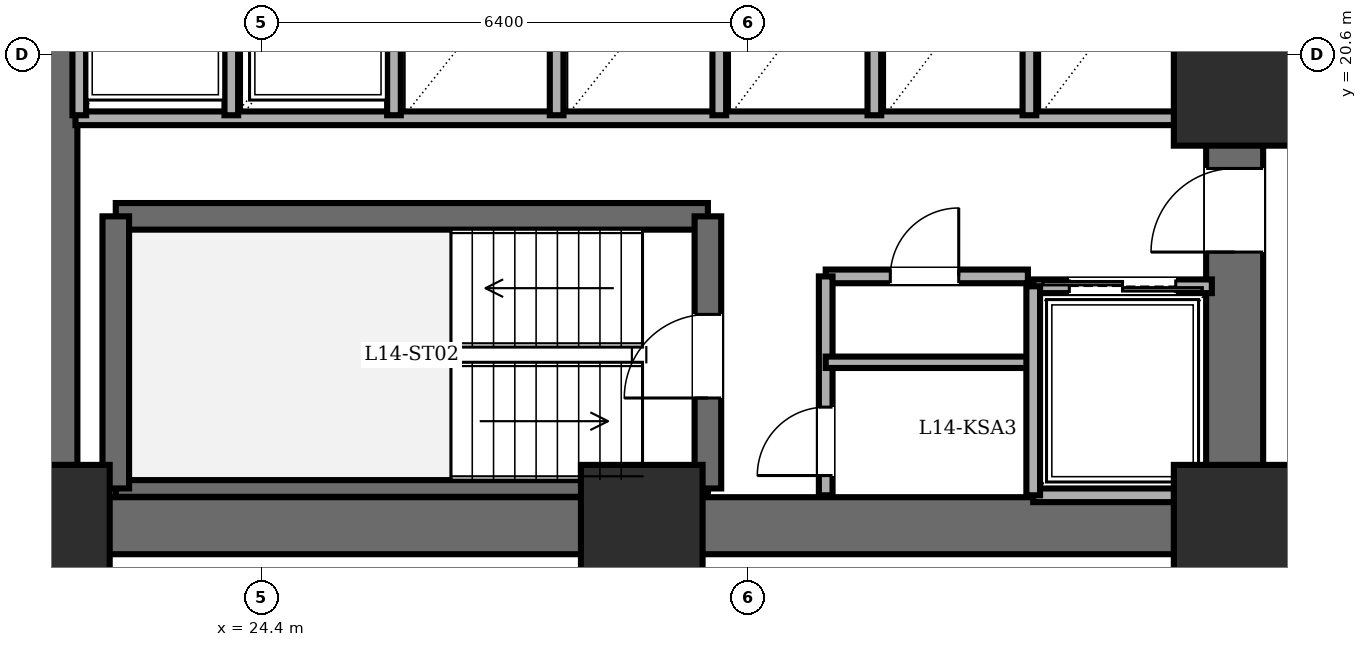
"""IFC4 building model, lengths in metres.
Left out: names, types, materials, properties, quantities, classifications, styles, units other than length and angle.
Written with IfcOpenShell. Run it as: python <this file> out.ifc"""

import sys

from ifc_helpers import new_model, si_unit, direction, frame, frame_2d, origin, origin_2d, place, context, subcontext, project, spatial, rectangle, extrude, element, fill, save


model = new_model("IFC4")
c1 = context("Model", 3, precision=1e-05, world=origin(), true_north=direction((0.0, 1.0)))
c2 = subcontext(c1, "Body", "Model", "MODEL_VIEW")
j1 = project(units=[si_unit("LENGTHUNIT", "METRE"), si_unit("PLANEANGLEUNIT", "RADIAN")], contexts=[c1])
p1 = place(None, origin())
s1 = spatial("IfcSite", under=j1, at=p1, CompositionType="ELEMENT")
p2 = place(p1, origin())
s2 = spatial("IfcBuilding", under=s1, at=p2, CompositionType="ELEMENT")
p3 = place(p2, frame((0.0, 0.0, 54.0)))
s3 = spatial("IfcBuildingStorey", under=s2, at=p3, CompositionType="ELEMENT", Elevation=54.0)
for number, where, z_axis, x_axis in (
    (1, (21.6, 14.4, 0.0), (0.0, 0.0, 1.0), (1.0, 0.0, 0.0)),
    (2, (29.4, 14.4, 0.0), (0.0, 0.0, 1.0), (1.0, 0.0, 0.0)),
    (3, (37.2, 14.4, 0.0), (0.0, 0.0, 1.0), (1.0, 0.0, 0.0)),
    (4, (37.2, 20.2, 0.0), (0.0, 0.0, 1.0), (1.0, 0.0, 0.0)),
):
    element("IfcColumn", number, at=place(p3, frame(where, z_axis=z_axis, x_axis=x_axis)), inside=s3, PredefinedType="COLUMN", context=c2, shape_type="SweptSolid", body=[
        extrude(rectangle(XDim=1.6, YDim=1.6, at=origin_2d()), origin(), (0.0, 0.0, 1.0), 3.6),
    ])
p4 = place(p3, frame((21.6, 14.4, 0.0), z_axis=(0.0, 0.0, 1.0), x_axis=(0.0, 1.0, 0.0)))
e5 = element("IfcWall", 5, at=p4, inside=s3, PredefinedType="SHEAR", context=c2, shape_type="SweptSolid", body=[
    extrude(rectangle(XDim=19.2, YDim=0.75, at=frame_2d((9.6, 0.0))), origin(), (0.0, 0.0, 1.0), 3.4),
])
p5 = place(p3, frame((37.2, 14.4, 0.0), z_axis=(0.0, 0.0, 1.0), x_axis=(-1.0, 0.0, 0.0)))
e6 = element("IfcWall", 6, at=p5, inside=s3, PredefinedType="SHEAR", context=c2, shape_type="SweptSolid", body=[
    extrude(rectangle(XDim=15.6, YDim=0.75, at=frame_2d((7.8, 0.0))), origin(), (0.0, 0.0, 1.0), 3.4),
])
p6 = place(p3, frame((37.2, 14.4, 0.0), z_axis=(0.0, 0.0, 1.0), x_axis=(0.0, 1.0, 0.0)))
e7 = element("IfcWall", 7, at=p6, inside=s3, PredefinedType="SHEAR", context=c2, shape_type="SweptSolid", body=[
    extrude(rectangle(XDim=19.2, YDim=0.75, at=frame_2d((9.6, 0.0))), origin(), (0.0, 0.0, 1.0), 3.4),
])
p7 = place(p6, frame((15.8, 0.0, 0.0)))
e8 = element("IfcOpeningElement", 8, at=p7, cuts=e7, PredefinedType="OPENING", context=c2, shape_type="SweptSolid", body=[
    extrude(rectangle(XDim=1.15, YDim=2.15, at=frame_2d((0.575, 1.075))), frame((0.0, 0.385, 0.0), z_axis=(0.0, -1.0, 0.0), x_axis=(1.0, 0.0, 0.0)), (0.0, 0.0, 1.0), 0.77),
])
p8 = place(p6, frame((3.6, 0.0, 0.0)))
e9 = element("IfcOpeningElement", 9, at=p8, cuts=e7, PredefinedType="OPENING", context=c2, shape_type="SweptSolid", body=[
    extrude(rectangle(XDim=1.1, YDim=2.15, at=frame_2d((0.55, 1.075))), frame((0.0, 0.385, 0.0), z_axis=(0.0, -1.0, 0.0), x_axis=(1.0, 0.0, 0.0)), (0.0, 0.0, 1.0), 0.77),
])
p9 = place(p6, frame((8.6, 0.0, 0.0)))
e10 = element("IfcOpeningElement", 10, at=p9, cuts=e7, PredefinedType="OPENING", context=c2, shape_type="SweptSolid", body=[
    extrude(rectangle(XDim=1.3, YDim=2.2, at=frame_2d((0.65, 1.1))), frame((0.0, 0.385, 0.0), z_axis=(0.0, -1.0, 0.0), x_axis=(1.0, 0.0, 0.0)), (0.0, 0.0, 1.0), 0.77),
])
p10 = place(p3, frame((22.48, 18.47, 0.0), z_axis=(0.0, 0.0, 1.0), x_axis=(1.0, 0.0, 0.0)))
e11 = element("IfcWall", 11, at=p10, inside=s3, PredefinedType="SOLIDWALL", context=c2, shape_type="SweptSolid", body=[
    extrude(rectangle(XDim=7.79, YDim=0.35, at=frame_2d((3.895, 0.0))), origin(), (0.0, 0.0, 1.0), 3.4),
])
p11 = place(p3, frame((22.48, 14.89, 0.0), z_axis=(0.0, 0.0, 1.0), x_axis=(1.0, 0.0, 0.0)))
e12 = element("IfcWall", 12, at=p11, inside=s3, PredefinedType="PARTITIONING", context=c2, shape_type="SweptSolid", body=[
    extrude(rectangle(XDim=7.79, YDim=0.22, at=frame_2d((3.895, 0.0))), origin(), (0.0, 0.0, 1.0), 3.4),
])
p12 = place(p3, frame((22.48, 14.89, 0.0), z_axis=(0.0, 0.0, 1.0), x_axis=(0.0, 1.0, 0.0)))
e13 = element("IfcWall", 13, at=p12, inside=s3, PredefinedType="SOLIDWALL", context=c2, shape_type="SweptSolid", body=[
    extrude(rectangle(XDim=3.58, YDim=0.35, at=frame_2d((1.79, 0.0))), origin(), (0.0, 0.0, 1.0), 3.4),
])
p13 = place(p3, frame((30.27, 14.89, 0.0), z_axis=(0.0, 0.0, 1.0), x_axis=(0.0, 1.0, 0.0)))
e14 = element("IfcWall", 14, at=p13, inside=s3, PredefinedType="SOLIDWALL", context=c2, shape_type="SweptSolid", body=[
    extrude(rectangle(XDim=3.58, YDim=0.35, at=frame_2d((1.79, 0.0))), origin(), (0.0, 0.0, 1.0), 3.4),
])
p14 = place(p13, frame((1.19, 0.0, 0.0)))
e15 = element("IfcOpeningElement", 15, at=p14, cuts=e14, PredefinedType="OPENING", context=c2, shape_type="SweptSolid", body=[
    extrude(rectangle(XDim=1.1, YDim=2.15, at=frame_2d((0.55, 1.075))), frame((0.0, 0.185, 0.0), z_axis=(0.0, -1.0, 0.0), x_axis=(1.0, 0.0, 0.0)), (0.0, 0.0, 1.0), 0.37),
])
p15 = place(p3, frame((21.95, 19.76, 0.0), z_axis=(0.0, 0.0, 1.0), x_axis=(1.0, 0.0, 0.0)))
e16 = element("IfcWall", 16, at=p15, inside=s3, PredefinedType="PARTITIONING", context=c2, shape_type="SweptSolid", body=[
    extrude(rectangle(XDim=14.87, YDim=0.18, at=frame_2d((7.435, 0.0))), origin(), (0.0, 0.0, 1.0), 3.4),
])
p16 = place(p3, frame((31.82, 17.68, 0.0), z_axis=(0.0, 0.0, 1.0), x_axis=(1.0, 0.0, 0.0)))
e17 = element("IfcWall", 17, at=p16, inside=s3, PredefinedType="PARTITIONING", context=c2, shape_type="SweptSolid", body=[
    extrude(rectangle(XDim=2.66, YDim=0.18, at=frame_2d((1.33, 0.0))), origin(), (0.0, 0.0, 1.0), 3.4),
])
p17 = place(p16, frame((0.85, 0.0, 0.0)))
e18 = element("IfcOpeningElement", 18, at=p17, cuts=e17, PredefinedType="OPENING", context=c2, shape_type="SweptSolid", body=[
    extrude(rectangle(XDim=0.9, YDim=2.05, at=frame_2d((0.45, 1.025))), frame((0.0, 0.1, 0.0), z_axis=(0.0, -1.0, 0.0), x_axis=(1.0, 0.0, 0.0)), (0.0, 0.0, 1.0), 0.2),
])
p18 = place(p3, frame((31.82, 14.8, 0.0), z_axis=(0.0, 0.0, 1.0), x_axis=(0.0, 1.0, 0.0)))
e19 = element("IfcWall", 19, at=p18, inside=s3, PredefinedType="PARTITIONING", context=c2, shape_type="SweptSolid", body=[
    extrude(rectangle(XDim=2.88, YDim=0.18, at=frame_2d((1.44, 0.0))), origin(), (0.0, 0.0, 1.0), 3.4),
])
p19 = place(p18, frame((0.26, 0.0, 0.0)))
e20 = element("IfcOpeningElement", 20, at=p19, cuts=e19, PredefinedType="OPENING", context=c2, shape_type="SweptSolid", body=[
    extrude(rectangle(XDim=0.9, YDim=2.05, at=frame_2d((0.45, 1.025))), frame((0.0, 0.1, 0.0), z_axis=(0.0, -1.0, 0.0), x_axis=(1.0, 0.0, 0.0)), (0.0, 0.0, 1.0), 0.2),
])
p20 = place(p3, frame((31.82, 16.55, 0.0), z_axis=(0.0, 0.0, 1.0), x_axis=(1.0, 0.0, 0.0)))
e21 = element("IfcWall", 21, at=p20, inside=s3, PredefinedType="PARTITIONING", context=c2, shape_type="SweptSolid", body=[
    extrude(rectangle(XDim=2.66, YDim=0.15, at=frame_2d((1.33, 0.0))), origin(), (0.0, 0.0, 1.0), 3.4),
])
p21 = place(p3, frame((34.55, 17.55, 0.0), z_axis=(0.0, 0.0, 1.0), x_axis=(1.0, 0.0, 0.0)))
e22 = element("IfcWall", 22, at=p21, inside=s3, PredefinedType="PARTITIONING", context=c2, shape_type="SweptSolid", body=[
    extrude(rectangle(XDim=2.35, YDim=0.18, at=frame_2d((1.175, 0.0))), origin(), (0.0, 0.0, 1.0), 3.4),
])
p22 = place(p21, frame((0.475, 0.0, 0.0)))
e23 = element("IfcOpeningElement", 23, at=p22, cuts=e22, PredefinedType="OPENING", context=c2, shape_type="SweptSolid", body=[
    extrude(rectangle(XDim=1.4, YDim=2.3, at=frame_2d((0.7, 1.15))), frame((0.0, 0.1, 0.0), z_axis=(0.0, -1.0, 0.0), x_axis=(1.0, 0.0, 0.0)), (0.0, 0.0, 1.0), 0.2),
])
p23 = place(p3, frame((36.9, 14.8, 0.0), z_axis=(0.0, 0.0, 1.0), x_axis=(-1.0, 0.0, 0.0)))
e24 = element("IfcWall", 24, at=p23, inside=s3, PredefinedType="PARTITIONING", context=c2, shape_type="SweptSolid", body=[
    extrude(rectangle(XDim=2.35, YDim=0.18, at=frame_2d((1.175, 0.0))), origin(), (0.0, 0.0, 1.0), 3.4),
])
p24 = place(p3, frame((34.55, 17.55, 0.0), z_axis=(0.0, 0.0, 1.0), x_axis=(0.0, -1.0, 0.0)))
e25 = element("IfcWall", 25, at=p24, inside=s3, PredefinedType="PARTITIONING", context=c2, shape_type="SweptSolid", body=[
    extrude(rectangle(XDim=2.75, YDim=0.18, at=frame_2d((1.375, 0.0))), origin(), (0.0, 0.0, 1.0), 3.4),
])
for number, where, z_axis, x_axis in (
    (26, (24.0, 19.8, 0.0), (0.0, 0.0, 1.0), (0.0, 1.0, 0.0)),
    (27, (22.0, 22.3, 0.0), (0.0, 0.0, 1.0), (0.0, -1.0, 0.0)),
    (28, (26.14, 19.8, 0.0), (0.0, 0.0, 1.0), (0.0, 1.0, 0.0)),
    (29, (28.28, 19.8, 0.0), (0.0, 0.0, 1.0), (0.0, 1.0, 0.0)),
    (30, (30.42, 19.8, 0.0), (0.0, 0.0, 1.0), (0.0, 1.0, 0.0)),
    (31, (32.46, 19.8, 0.0), (0.0, 0.0, 1.0), (0.0, 1.0, 0.0)),
    (32, (34.5, 19.8, 0.0), (0.0, 0.0, 1.0), (0.0, 1.0, 0.0)),
    (33, (36.54, 19.8, 0.0), (0.0, 0.0, 1.0), (0.0, 1.0, 0.0)),
):
    element("IfcWall", number, at=place(p3, frame(where, z_axis=z_axis, x_axis=x_axis)), inside=s3, PredefinedType="PARTITIONING", context=c2, shape_type="SweptSolid", body=[
        extrude(rectangle(XDim=2.5, YDim=0.18, at=frame_2d((1.25, 0.0))), origin(), (0.0, 0.0, 1.0), 3.4),
    ])
p25 = place(p14, origin())
e34 = element("IfcDoor", 34, at=p25, inside=s3, OperationType="SINGLE_SWING_LEFT", PredefinedType="DOOR", context=c2, shape_type="SweptSolid", body=[
    extrude(rectangle(XDim=1.1, YDim=2.15, at=frame_2d((0.55, 1.075))), frame((0.0, 0.025, 0.0), z_axis=(0.0, -1.0, 0.0), x_axis=(1.0, 0.0, 0.0)), (0.0, 0.0, 1.0), 0.05),
])
fill(e15, e34)
p26 = place(p8, origin())
e35 = element("IfcDoor", 35, at=p26, inside=s3, OperationType="SINGLE_SWING_LEFT", PredefinedType="DOOR", context=c2, shape_type="SweptSolid", body=[
    extrude(rectangle(XDim=1.1, YDim=2.15, at=frame_2d((0.55, 1.075))), frame((0.0, 0.025, 0.0), z_axis=(0.0, -1.0, 0.0), x_axis=(1.0, 0.0, 0.0)), (0.0, 0.0, 1.0), 0.05),
])
fill(e9, e35)
p27 = place(p17, origin())
e36 = element("IfcDoor", 36, at=p27, inside=s3, OperationType="SINGLE_SWING_RIGHT", PredefinedType="DOOR", context=c2, shape_type="SweptSolid", body=[
    extrude(rectangle(XDim=0.9, YDim=2.05, at=frame_2d((0.45, 1.025))), frame((0.0, 0.025, 0.0), z_axis=(0.0, -1.0, 0.0), x_axis=(1.0, 0.0, 0.0)), (0.0, 0.0, 1.0), 0.05),
])
fill(e18, e36)
p28 = place(p19, origin())
e37 = element("IfcDoor", 37, at=p28, inside=s3, OperationType="SINGLE_SWING_LEFT", PredefinedType="DOOR", context=c2, shape_type="SweptSolid", body=[
    extrude(rectangle(XDim=0.9, YDim=2.05, at=frame_2d((0.45, 1.025))), frame((0.0, 0.025, 0.0), z_axis=(0.0, -1.0, 0.0), x_axis=(1.0, 0.0, 0.0)), (0.0, 0.0, 1.0), 0.05),
])
fill(e20, e37)
p29 = place(p22, origin())
e38 = element("IfcDoor", 38, at=p29, inside=s3, OperationType="DOUBLE_DOOR_SLIDING", PredefinedType="DOOR", context=c2, shape_type="SweptSolid", body=[
    extrude(rectangle(XDim=1.4, YDim=2.3, at=frame_2d((0.7, 1.15))), frame((0.0, 0.025, 0.0), z_axis=(0.0, -1.0, 0.0), x_axis=(1.0, 0.0, 0.0)), (0.0, 0.0, 1.0), 0.05),
])
fill(e23, e38)
save(model, sys.argv[1])
